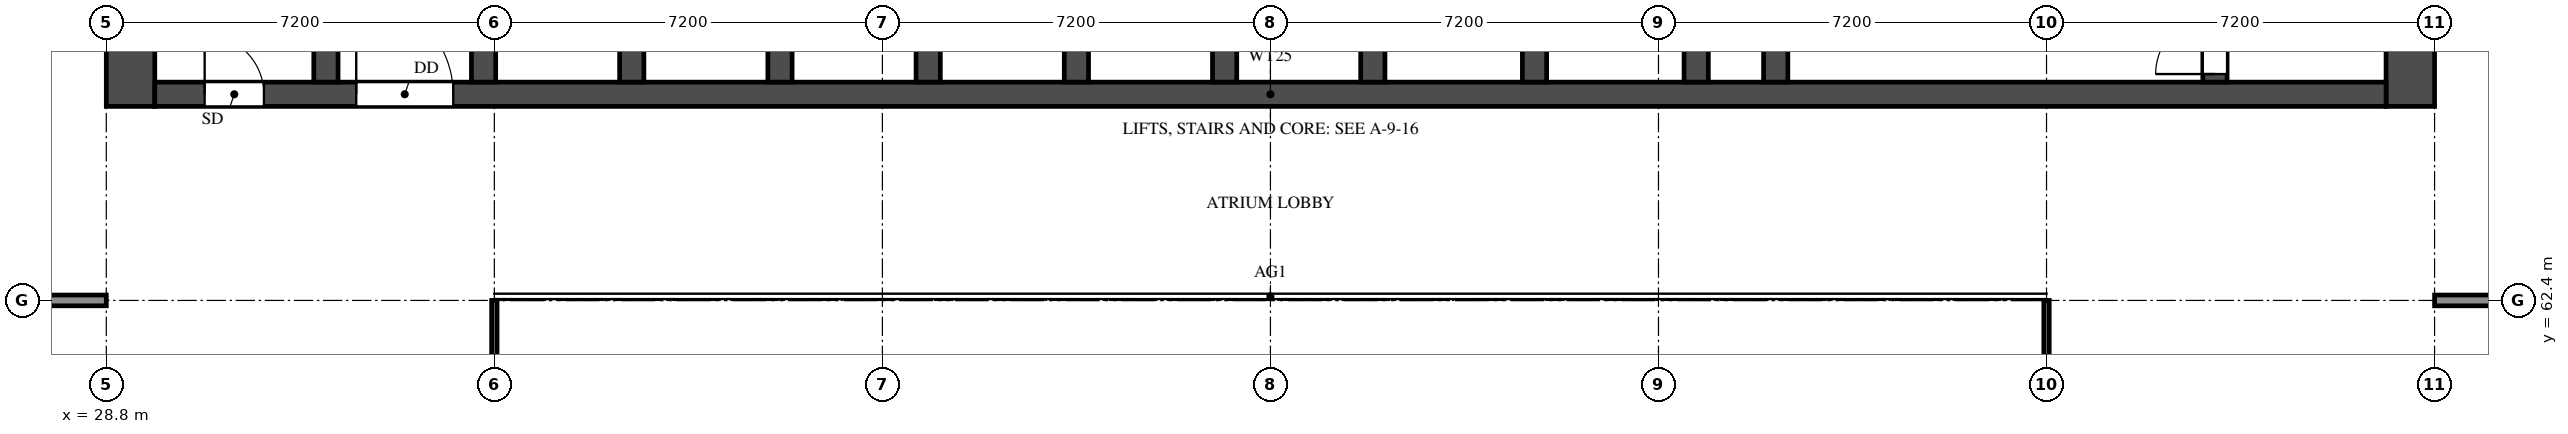
"""IFC4 building model, lengths in metres.
Left out: names, types, materials, properties, quantities, classifications, styles, units other than length and angle.
Written with IfcOpenShell. Run it as: python <this file> out.ifc"""

import sys

from ifc_helpers import new_model, si_unit, direction, frame, frame_2d, origin, place, context, subcontext, project, spatial, rectangle, extrude, element, fill, save


model = new_model("IFC4")
c1 = context("Model", 3, precision=1e-05, world=origin(), true_north=direction((0.0, 1.0)))
c2 = subcontext(c1, "Body", "Model", "MODEL_VIEW")
j1 = project(units=[si_unit("LENGTHUNIT", "METRE"), si_unit("PLANEANGLEUNIT", "RADIAN")], contexts=[c1])
p1 = place(None, origin())
s1 = spatial("IfcSite", under=j1, at=p1, CompositionType="ELEMENT")
p2 = place(p1, origin())
s2 = spatial("IfcBuilding", under=s1, at=p2, CompositionType="ELEMENT")
p3 = place(p2, frame((0.0, 0.0, 107.5)))
s3 = spatial("IfcBuildingStorey", under=s2, at=p3, CompositionType="ELEMENT", Elevation=107.5)
for number, where, z_axis, x_axis in (
    (1, (29.25, 66.0, 0.0), (0.0, 0.0, 1.0), (0.0, 1.0, 0.0)),
    (2, (71.55, 66.0, 0.0), (0.0, 0.0, 1.0), (0.0, 1.0, 0.0)),
):
    element("IfcWall", number, at=place(p3, frame(where, z_axis=z_axis, x_axis=x_axis)), inside=s3, PredefinedType="SHEAR", context=c2, shape_type="SweptSolid", body=[
        extrude(rectangle(XDim=12.0, YDim=0.9, at=frame_2d((6.0, 0.0))), origin(), (0.0, 0.0, 1.0), 5.2),
    ])
p4 = place(p3, frame((29.7, 66.225, 0.0), z_axis=(0.0, 0.0, 1.0), x_axis=(1.0, 0.0, 0.0)))
e3 = element("IfcWall", 3, at=p4, inside=s3, PredefinedType="SHEAR", context=c2, shape_type="SweptSolid", body=[
    extrude(rectangle(XDim=41.4, YDim=0.45, at=frame_2d((20.7, 0.0))), origin(), (0.0, 0.0, 1.0), 5.2),
])
p5 = place(p4, frame((0.925, 0.0, 0.0)))
e4 = element("IfcOpeningElement", 4, at=p5, cuts=e3, PredefinedType="OPENING", context=c2, shape_type="SweptSolid", body=[
    extrude(rectangle(XDim=1.1, YDim=2.1, at=frame_2d((0.55, 1.05))), frame((0.0, 0.235, 0.0), z_axis=(0.0, -1.0, 0.0), x_axis=(1.0, 0.0, 0.0)), (0.0, 0.0, 1.0), 0.47),
])
p6 = place(p4, frame((3.738, 0.0, 0.0)))
e5 = element("IfcOpeningElement", 5, at=p6, cuts=e3, PredefinedType="OPENING", context=c2, shape_type="SweptSolid", body=[
    extrude(rectangle(XDim=1.8, YDim=2.1, at=frame_2d((0.9, 1.05))), frame((0.0, 0.235, 0.0), z_axis=(0.0, -1.0, 0.0), x_axis=(1.0, 0.0, 0.0)), (0.0, 0.0, 1.0), 0.47),
])
p7 = place(p3, frame((32.875, 66.45, 0.0), z_axis=(0.0, 0.0, 1.0), x_axis=(0.0, 1.0, 0.0)))
e6 = element("IfcWall", 6, at=p7, inside=s3, PredefinedType="SHEAR", context=c2, shape_type="SweptSolid", body=[
    extrude(rectangle(XDim=10.65, YDim=0.45, at=frame_2d((5.325, 0.0))), origin(), (0.0, 0.0, 1.0), 5.2),
])
p8 = place(p3, frame((67.925, 66.45, 0.0), z_axis=(0.0, 0.0, 1.0), x_axis=(0.0, 1.0, 0.0)))
e7 = element("IfcWall", 7, at=p8, inside=s3, PredefinedType="SHEAR", context=c2, shape_type="SweptSolid", body=[
    extrude(rectangle(XDim=10.65, YDim=0.45, at=frame_2d((5.325, 0.0))), origin(), (0.0, 0.0, 1.0), 5.2),
])
p9 = place(p8, frame((0.15, 0.0, 0.0)))
e8 = element("IfcOpeningElement", 8, at=p9, cuts=e7, PredefinedType="OPENING", context=c2, shape_type="SweptSolid", body=[
    extrude(rectangle(XDim=1.1, YDim=2.1, at=frame_2d((0.55, 1.05))), frame((0.0, 0.235, 0.0), z_axis=(0.0, -1.0, 0.0), x_axis=(1.0, 0.0, 0.0)), (0.0, 0.0, 1.0), 0.47),
])
p10 = place(p3, frame((59.775, 66.45, 0.0), z_axis=(0.0, 0.0, 1.0), x_axis=(0.0, 1.0, 0.0)))
e9 = element("IfcWall", 9, at=p10, inside=s3, PredefinedType="SHEAR", context=c2, shape_type="SweptSolid", body=[
    extrude(rectangle(XDim=6.025, YDim=0.45, at=frame_2d((3.013, 0.0))), origin(), (0.0, 0.0, 1.0), 5.2),
])
p11 = place(p10, frame((3.85, 0.0, 0.0)))
e10 = element("IfcOpeningElement", 10, at=p11, cuts=e9, PredefinedType="OPENING", context=c2, shape_type="SweptSolid", body=[
    extrude(rectangle(XDim=1.2, YDim=2.1, at=frame_2d((0.6, 1.05))), frame((0.0, 0.235, 0.0), z_axis=(0.0, -1.0, 0.0), x_axis=(1.0, 0.0, 0.0)), (0.0, 0.0, 1.0), 0.47),
])
for number, where, z_axis, x_axis in (
    (11, (35.8, 66.45, 0.0), (0.0, 0.0, 1.0), (0.0, 1.0, 0.0)),
    (12, (38.55, 66.45, 0.0), (0.0, 0.0, 1.0), (0.0, 1.0, 0.0)),
    (13, (41.3, 66.45, 0.0), (0.0, 0.0, 1.0), (0.0, 1.0, 0.0)),
    (14, (44.05, 66.45, 0.0), (0.0, 0.0, 1.0), (0.0, 1.0, 0.0)),
    (15, (46.8, 66.45, 0.0), (0.0, 0.0, 1.0), (0.0, 1.0, 0.0)),
    (16, (49.55, 66.45, 0.0), (0.0, 0.0, 1.0), (0.0, 1.0, 0.0)),
    (17, (52.3, 66.45, 0.0), (0.0, 0.0, 1.0), (0.0, 1.0, 0.0)),
    (18, (55.3, 66.45, 0.0), (0.0, 0.0, 1.0), (0.0, 1.0, 0.0)),
    (19, (58.3, 66.45, 0.0), (0.0, 0.0, 1.0), (0.0, 1.0, 0.0)),
):
    element("IfcWall", number, at=place(p3, frame(where, z_axis=z_axis, x_axis=x_axis)), inside=s3, PredefinedType="SHEAR", context=c2, shape_type="SweptSolid", body=[
        extrude(rectangle(XDim=2.425, YDim=0.45, at=frame_2d((1.212, 0.0))), origin(), (0.0, 0.0, 1.0), 5.2),
    ])
p12 = place(p3, frame((15.45, 62.4, 0.0), z_axis=(0.0, 0.0, 1.0), x_axis=(1.0, 0.0, 0.0)))
e20 = element("IfcWall", 20, at=p12, inside=s3, PredefinedType="SOLIDWALL", context=c2, shape_type="SweptSolid", body=[
    extrude(rectangle(XDim=13.35, YDim=0.2, at=frame_2d((6.675, 0.0))), origin(), (0.0, 0.0, 1.0), 5.2),
])
p13 = place(p12, frame((6.9, 0.0, 0.0)))
e21 = element("IfcOpeningElement", 21, at=p13, cuts=e20, PredefinedType="OPENING", context=c2, shape_type="SweptSolid", body=[
    extrude(rectangle(XDim=1.1, YDim=2.1, at=frame_2d((0.55, 1.05))), frame((0.0, 0.11, 0.0), z_axis=(0.0, -1.0, 0.0), x_axis=(1.0, 0.0, 0.0)), (0.0, 0.0, 1.0), 0.22),
])
p14 = place(p3, frame((72.0, 62.4, 0.0), z_axis=(0.0, 0.0, 1.0), x_axis=(1.0, 0.0, 0.0)))
e22 = element("IfcWall", 22, at=p14, inside=s3, PredefinedType="SOLIDWALL", context=c2, shape_type="SweptSolid", body=[
    extrude(rectangle(XDim=13.35, YDim=0.2, at=frame_2d((6.675, 0.0))), origin(), (0.0, 0.0, 1.0), 5.2),
])
p15 = place(p14, frame((5.35, 0.0, 0.0)))
e23 = element("IfcOpeningElement", 23, at=p15, cuts=e22, PredefinedType="OPENING", context=c2, shape_type="SweptSolid", body=[
    extrude(rectangle(XDim=1.1, YDim=2.1, at=frame_2d((0.55, 1.05))), frame((0.0, 0.11, 0.0), z_axis=(0.0, -1.0, 0.0), x_axis=(1.0, 0.0, 0.0)), (0.0, 0.0, 1.0), 0.22),
])
for number, where, z_axis, x_axis in (
    (24, (36.0, 48.0, 0.0), (0.0, 0.0, 1.0), (0.0, 1.0, 0.0)),
    (25, (64.8, 48.0, 0.0), (0.0, 0.0, 1.0), (0.0, 1.0, 0.0)),
):
    element("IfcWall", number, at=place(p3, frame(where, z_axis=z_axis, x_axis=x_axis)), inside=s3, PredefinedType="PARTITIONING", context=c2, shape_type="SweptSolid", body=[
        extrude(rectangle(XDim=14.4, YDim=0.1, at=frame_2d((7.2, 0.0))), origin(), (0.0, 0.0, 1.0), 4.3),
    ])
p16 = place(p5, origin())
e26 = element("IfcDoor", 26, at=p16, inside=s3, OperationType="SINGLE_SWING_LEFT", PredefinedType="DOOR", context=c2, shape_type="SweptSolid", body=[
    extrude(rectangle(XDim=1.1, YDim=2.1, at=frame_2d((0.55, 1.05))), frame((0.0, 0.025, 0.0), z_axis=(0.0, -1.0, 0.0), x_axis=(1.0, 0.0, 0.0)), (0.0, 0.0, 1.0), 0.05),
])
fill(e4, e26)
p17 = place(p9, origin())
e27 = element("IfcDoor", 27, at=p17, inside=s3, OperationType="SINGLE_SWING_LEFT", PredefinedType="DOOR", context=c2, shape_type="SweptSolid", body=[
    extrude(rectangle(XDim=1.1, YDim=2.1, at=frame_2d((0.55, 1.05))), frame((0.0, 0.025, 0.0), z_axis=(0.0, -1.0, 0.0), x_axis=(1.0, 0.0, 0.0)), (0.0, 0.0, 1.0), 0.05),
])
fill(e8, e27)
p18 = place(p6, origin())
e28 = element("IfcDoor", 28, at=p18, inside=s3, OperationType="DOUBLE_DOOR_SINGLE_SWING", PredefinedType="DOOR", context=c2, shape_type="SweptSolid", body=[
    extrude(rectangle(XDim=1.8, YDim=2.1, at=frame_2d((0.9, 1.05))), frame((0.0, 0.025, 0.0), z_axis=(0.0, -1.0, 0.0), x_axis=(1.0, 0.0, 0.0)), (0.0, 0.0, 1.0), 0.05),
])
fill(e5, e28)
save(model, sys.argv[1])
